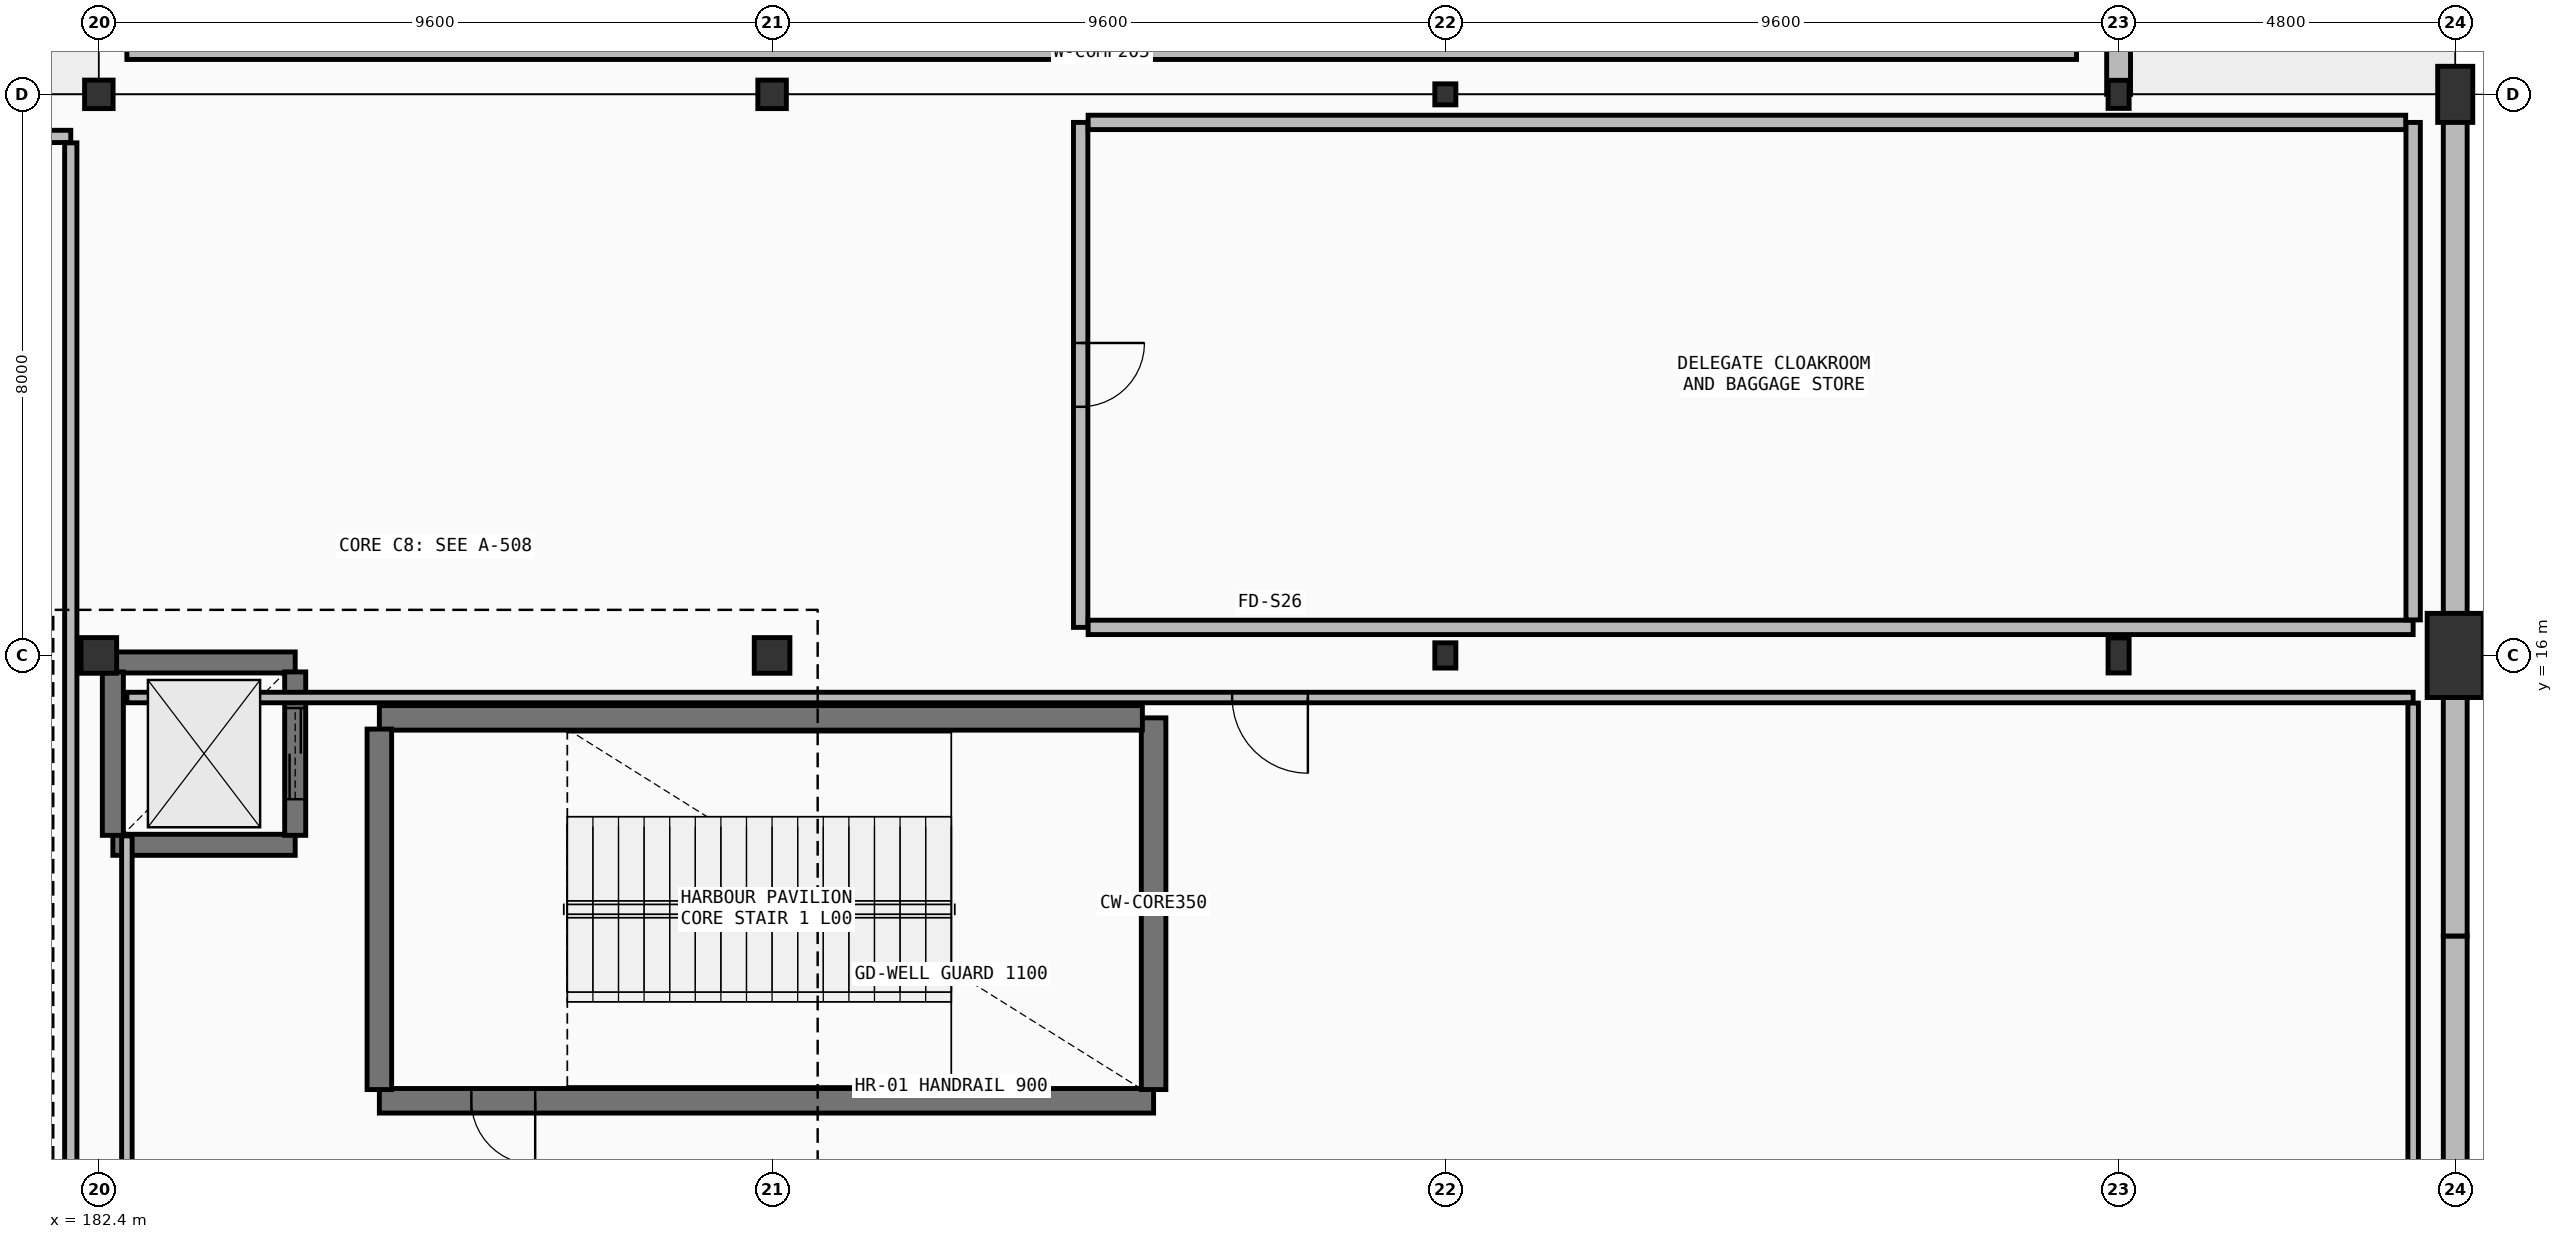
"""IFC4 building model, lengths in metres.
Left out: names, types, materials, properties, quantities, classifications, styles, units other than length and angle.
Written with IfcOpenShell. Run it as: python <this file> out.ifc"""

import sys

from ifc_helpers import new_model, si_unit, direction, frame, frame_2d, origin, origin_2d, place, context, subcontext, project, spatial, rectangle, hollow_circle, i_section, extrude, element, fill, save


model = new_model("IFC4")
c1 = context("Model", 3, precision=1e-05, world=origin(), true_north=direction((0.0, 1.0)))
c2 = subcontext(c1, "Body", "Model", "MODEL_VIEW")
j1 = project(units=[si_unit("LENGTHUNIT", "METRE"), si_unit("PLANEANGLEUNIT", "RADIAN")], contexts=[c1])
p1 = place(None, origin())
s1 = spatial("IfcSite", under=j1, at=p1, CompositionType="ELEMENT")
p2 = place(p1, origin())
s2 = spatial("IfcBuilding", under=s1, at=p2, CompositionType="ELEMENT")
p3 = place(p2, origin())
s3 = spatial("IfcBuildingStorey", under=s2, at=p3, CompositionType="ELEMENT", Elevation=0.0)
p4 = place(p3, frame((182.4, 16.0, 0.0), z_axis=(0.0, 0.0, 1.0), x_axis=(1.0, 0.0, 0.0)))
e1 = element("IfcColumn", 1, at=p4, inside=s3, PredefinedType="COLUMN", context=c2, shape_type="SweptSolid", body=[
    extrude(hollow_circle(Radius=0.254, WallThickness=0.025, at=origin_2d()), origin(), (0.0, 0.0, 1.0), 6.0),
])
p5 = place(p3, frame((182.4, 24.0, 0.0), z_axis=(0.0, 0.0, 1.0), x_axis=(1.0, 0.0, 0.0)))
e2 = element("IfcColumn", 2, at=p5, inside=s3, PredefinedType="COLUMN", context=c2, shape_type="SweptSolid", body=[
    extrude(hollow_circle(Radius=0.203, WallThickness=0.02, at=origin_2d()), origin(), (0.0, 0.0, 1.0), 6.0),
])
p6 = place(p3, frame((192.0, 16.0, 0.0), z_axis=(0.0, 0.0, 1.0), x_axis=(1.0, 0.0, 0.0)))
e3 = element("IfcColumn", 3, at=p6, inside=s3, PredefinedType="COLUMN", context=c2, shape_type="SweptSolid", body=[
    extrude(hollow_circle(Radius=0.254, WallThickness=0.025, at=origin_2d()), origin(), (0.0, 0.0, 1.0), 6.0),
])
p7 = place(p3, frame((192.0, 24.0, 0.0), z_axis=(0.0, 0.0, 1.0), x_axis=(1.0, 0.0, 0.0)))
e4 = element("IfcColumn", 4, at=p7, inside=s3, PredefinedType="COLUMN", context=c2, shape_type="SweptSolid", body=[
    extrude(hollow_circle(Radius=0.203, WallThickness=0.02, at=origin_2d()), origin(), (0.0, 0.0, 1.0), 6.0),
])
p8 = place(p3, frame((201.6, 16.0, 0.0), z_axis=(0.0, 0.0, 1.0), x_axis=(1.0, 0.0, 0.0)))
e5 = element("IfcColumn", 5, at=p8, inside=s3, PredefinedType="COLUMN", context=c2, shape_type="SweptSolid", body=[
    extrude(i_section(OverallWidth=0.3, OverallDepth=0.36, WebThickness=0.012, FlangeThickness=0.022, FilletRadius=0.027, at=origin_2d()), origin(), (0.0, 0.0, 1.0), 6.0),
])
p9 = place(p3, frame((201.6, 24.0, 0.0), z_axis=(0.0, 0.0, 1.0), x_axis=(1.0, 0.0, 0.0)))
e6 = element("IfcColumn", 6, at=p9, inside=s3, PredefinedType="COLUMN", context=c2, shape_type="SweptSolid", body=[
    extrude(i_section(OverallWidth=0.3, OverallDepth=0.3, WebThickness=0.011, FlangeThickness=0.019, FilletRadius=0.027, at=origin_2d()), origin(), (0.0, 0.0, 1.0), 6.0),
])
p10 = place(p3, frame((211.2, 16.0, 0.0), z_axis=(0.0, 0.0, 1.0), x_axis=(1.0, 0.0, 0.0)))
e7 = element("IfcColumn", 7, at=p10, inside=s3, PredefinedType="COLUMN", context=c2, shape_type="SweptSolid", body=[
    extrude(i_section(OverallWidth=0.3, OverallDepth=0.5, WebThickness=0.014, FlangeThickness=0.028, FilletRadius=0.027, at=origin_2d()), origin(), (0.0, 0.0, 1.0), 6.0),
])
p11 = place(p3, frame((211.2, 24.0, 0.0), z_axis=(0.0, 0.0, 1.0), x_axis=(1.0, 0.0, 0.0)))
e8 = element("IfcColumn", 8, at=p11, inside=s3, PredefinedType="COLUMN", context=c2, shape_type="SweptSolid", body=[
    extrude(i_section(OverallWidth=0.3, OverallDepth=0.4, WebThickness=0.013, FlangeThickness=0.024, FilletRadius=0.027, at=origin_2d()), origin(), (0.0, 0.0, 1.0), 6.0),
])
p12 = place(p3, frame((216.0, 16.0, -5.4), z_axis=(0.0, 0.0, 1.0), x_axis=(1.0, 0.0, 0.0)))
e9 = element("IfcColumn", 9, at=p12, inside=s3, PredefinedType="PILASTER", context=c2, shape_type="SweptSolid", body=[
    extrude(rectangle(XDim=0.8, YDim=1.2, at=origin_2d()), origin(), (0.0, 0.0, 1.0), 11.4),
])
p13 = place(p3, frame((216.0, 24.0, -5.4), z_axis=(0.0, 0.0, 1.0), x_axis=(1.0, 0.0, 0.0)))
e10 = element("IfcColumn", 10, at=p13, inside=s3, PredefinedType="PILASTER", context=c2, shape_type="SweptSolid", body=[
    extrude(rectangle(XDim=0.5, YDim=0.8, at=origin_2d()), origin(), (0.0, 0.0, 1.0), 11.4),
])
p14 = place(p3, frame((216.0, 0.0, 0.0), z_axis=(0.0, 0.0, 1.0), x_axis=(0.0, 1.0, 0.0)))
e11 = element("IfcWall", 11, at=p14, inside=s3, PredefinedType="SOLIDWALL", context=c2, shape_type="SweptSolid", body=[
    extrude(rectangle(XDim=12.0, YDim=0.34, at=frame_2d((6.0, 0.0))), origin(), (0.0, 0.0, 1.0), 5.04),
])
p15 = place(p3, frame((216.0, 12.0, 0.0), z_axis=(0.0, 0.0, 1.0), x_axis=(0.0, 1.0, 0.0)))
e12 = element("IfcWall", 12, at=p15, inside=s3, PredefinedType="SOLIDWALL", context=c2, shape_type="SweptSolid", body=[
    extrude(rectangle(XDim=12.0, YDim=0.34, at=frame_2d((6.0, 0.0))), origin(), (0.0, 0.0, 1.0), 5.09),
])
p16 = place(p3, frame((197.44, 9.65, 0.0), z_axis=(0.0, 0.0, 1.0), x_axis=(-1.0, 0.0, 0.0)))
e13 = element("IfcWall", 13, at=p16, inside=s3, PredefinedType="SHEAR", context=c2, shape_type="SweptSolid", body=[
    extrude(rectangle(XDim=11.04, YDim=0.35, at=frame_2d((5.52, 0.0))), origin(), (0.0, 0.0, 1.0), 5.77),
])
p17 = place(p16, frame((8.818, 0.0, 0.0)))
e14 = element("IfcOpeningElement", 14, at=p17, cuts=e13, PredefinedType="OPENING", context=c2, shape_type="SweptSolid", body=[
    extrude(rectangle(XDim=0.91, YDim=2.08, at=frame_2d((0.455, 1.04))), frame((0.0, 0.185, 0.0), z_axis=(0.0, -1.0, 0.0), x_axis=(1.0, 0.0, 0.0)), (0.0, 0.0, 1.0), 0.37),
])
p18 = place(p3, frame((197.44, 15.11, 0.0), z_axis=(0.0, 0.0, 1.0), x_axis=(0.0, -1.0, 0.0)))
e15 = element("IfcWall", 15, at=p18, inside=s3, PredefinedType="SHEAR", context=c2, shape_type="SweptSolid", body=[
    extrude(rectangle(XDim=5.3, YDim=0.35, at=frame_2d((2.65, 0.0))), origin(), (0.0, 0.0, 1.0), 5.77),
])
p19 = place(p3, frame((186.4, 15.11, 0.0), z_axis=(0.0, 0.0, 1.0), x_axis=(1.0, 0.0, 0.0)))
e16 = element("IfcWall", 16, at=p19, inside=s3, PredefinedType="SHEAR", context=c2, shape_type="SweptSolid", body=[
    extrude(rectangle(XDim=10.88, YDim=0.35, at=frame_2d((5.44, 0.0))), origin(), (0.0, 0.0, 1.0), 5.77),
])
p20 = place(p3, frame((186.4, 9.81, 0.0), z_axis=(0.0, 0.0, 1.0), x_axis=(0.0, 1.0, 0.0)))
e17 = element("IfcWall", 17, at=p20, inside=s3, PredefinedType="SHEAR", context=c2, shape_type="SweptSolid", body=[
    extrude(rectangle(XDim=5.14, YDim=0.35, at=frame_2d((2.57, 0.0))), origin(), (0.0, 0.0, 1.0), 5.77),
])
for number, where, z_axis, x_axis in (
    (18, (185.2, 15.9, 0.0), (0.0, 0.0, 1.0), (-1.0, 0.0, 0.0)),
    (19, (182.6, 13.3, 0.0), (0.0, 0.0, 1.0), (1.0, 0.0, 0.0)),
):
    element("IfcWall", number, at=place(p3, frame(where, z_axis=z_axis, x_axis=x_axis)), inside=s3, PredefinedType="SHEAR", context=c2, shape_type="SweptSolid", body=[
        extrude(rectangle(XDim=2.6, YDim=0.3, at=frame_2d((1.3, 0.0))), origin(), (0.0, 0.0, 1.0), 5.77),
    ])
p21 = place(p3, frame((185.2, 13.435, 0.0), z_axis=(0.0, 0.0, 1.0), x_axis=(0.0, 1.0, 0.0)))
e20 = element("IfcWall", 20, at=p21, inside=s3, PredefinedType="SHEAR", context=c2, shape_type="SweptSolid", body=[
    extrude(rectangle(XDim=2.33, YDim=0.3, at=frame_2d((1.165, 0.0))), origin(), (0.0, 0.0, 1.0), 5.77),
])
p22 = place(p21, frame((0.515, 0.0, 0.0)))
e21 = element("IfcOpeningElement", 21, at=p22, cuts=e20, PredefinedType="OPENING", context=c2, shape_type="SweptSolid", body=[
    extrude(rectangle(XDim=1.3, YDim=2.22, at=frame_2d((0.65, 1.11))), frame((0.0, 0.16, 0.0), z_axis=(0.0, -1.0, 0.0), x_axis=(1.0, 0.0, 0.0)), (0.0, 0.0, 1.0), 0.32),
])
p23 = place(p3, frame((182.6, 15.765, 0.0), z_axis=(0.0, 0.0, 1.0), x_axis=(0.0, -1.0, 0.0)))
e22 = element("IfcWall", 22, at=p23, inside=s3, PredefinedType="SHEAR", context=c2, shape_type="SweptSolid", body=[
    extrude(rectangle(XDim=2.33, YDim=0.3, at=frame_2d((1.165, 0.0))), origin(), (0.0, 0.0, 1.0), 5.77),
])
p24 = place(p3, frame((182.8, 24.6, 0.0), z_axis=(0.0, 0.0, 1.0), x_axis=(1.0, 0.0, 0.0)))
e23 = element("IfcWall", 23, at=p24, inside=s3, PredefinedType="SOLIDWALL", context=c2, shape_type="SweptSolid", body=[
    extrude(rectangle(XDim=27.8, YDim=0.205, at=frame_2d((13.9, 0.0))), origin(), (0.0, 0.0, 1.0), 5.02),
])
p25 = place(p3, frame((182.0, 23.4, 0.0), z_axis=(0.0, 0.0, 1.0), x_axis=(-1.0, 0.0, 0.0)))
e24 = element("IfcWall", 24, at=p25, inside=s3, PredefinedType="PARTITIONING", context=c2, shape_type="SweptSolid", body=[
    extrude(rectangle(XDim=37.6, YDim=0.175, at=frame_2d((18.8, 0.0))), origin(), (0.0, 0.0, 1.0), 5.14),
])
p26 = place(p25, frame((14.256, 0.0, 0.0)))
e25 = element("IfcOpeningElement", 25, at=p26, cuts=e24, PredefinedType="OPENING", context=c2, shape_type="SweptSolid", body=[
    extrude(rectangle(XDim=1.96, YDim=2.36, at=frame_2d((0.98, 1.18))), frame((0.0, 0.097, 0.0), z_axis=(0.0, -1.0, 0.0), x_axis=(1.0, 0.0, 0.0)), (0.0, 0.0, 1.0), 0.195),
])
p27 = place(p25, frame((30.337, 0.0, 0.0)))
e26 = element("IfcOpeningElement", 26, at=p27, cuts=e24, PredefinedType="OPENING", context=c2, shape_type="SweptSolid", body=[
    extrude(rectangle(XDim=1.05, YDim=2.35, at=frame_2d((0.525, 1.175))), frame((0.0, 0.097, 0.0), z_axis=(0.0, -1.0, 0.0), x_axis=(1.0, 0.0, 0.0)), (0.0, 0.0, 1.0), 0.195),
])
p28 = place(p3, frame((182.0, 0.691, 0.0), z_axis=(0.0, 0.0, 1.0), x_axis=(0.0, 1.0, 0.0)))
e27 = element("IfcWall", 27, at=p28, inside=s3, PredefinedType="PARTITIONING", context=c2, shape_type="SweptSolid", body=[
    extrude(rectangle(XDim=22.617, YDim=0.175, at=frame_2d((11.309, 0.0))), origin(), (0.0, 0.0, 1.0), 5.14),
])
p29 = place(p3, frame((215.4, 15.4, 0.0), z_axis=(0.0, 0.0, 1.0), x_axis=(-1.0, 0.0, 0.0)))
e28 = element("IfcWall", 28, at=p29, inside=s3, PredefinedType="PARTITIONING", context=c2, shape_type="SweptSolid", body=[
    extrude(rectangle(XDim=32.6, YDim=0.15, at=frame_2d((16.3, 0.0))), origin(), (0.0, 0.0, 1.0), 4.84),
])
p30 = place(p29, frame((15.76, 0.0, 0.0)))
e29 = element("IfcOpeningElement", 29, at=p30, cuts=e28, PredefinedType="OPENING", context=c2, shape_type="SweptSolid", body=[
    extrude(rectangle(XDim=1.08, YDim=2.38, at=frame_2d((0.54, 1.19))), frame((0.0, 0.085, 0.0), z_axis=(0.0, -1.0, 0.0), x_axis=(1.0, 0.0, 0.0)), (0.0, 0.0, 1.0), 0.17),
])
p31 = place(p3, frame((215.4, 0.679, 0.0), z_axis=(0.0, 0.0, 1.0), x_axis=(0.0, 1.0, 0.0)))
e30 = element("IfcWall", 30, at=p31, inside=s3, PredefinedType="PARTITIONING", context=c2, shape_type="SweptSolid", body=[
    extrude(rectangle(XDim=14.642, YDim=0.15, at=frame_2d((7.321, 0.0))), origin(), (0.0, 0.0, 1.0), 5.04),
])
p32 = place(p3, frame((182.8, 13.427, 0.0), z_axis=(0.0, 0.0, 1.0), x_axis=(0.0, -1.0, 0.0)))
e31 = element("IfcWall", 31, at=p32, inside=s3, PredefinedType="PARTITIONING", context=c2, shape_type="SweptSolid", body=[
    extrude(rectangle(XDim=12.748, YDim=0.15, at=frame_2d((6.374, 0.0))), origin(), (0.0, 0.0, 1.0), 5.19),
])
p33 = place(p3, frame((196.4, 23.6, 0.0), z_axis=(0.0, 0.0, 1.0), x_axis=(0.0, -1.0, 0.0)))
e32 = element("IfcWall", 32, at=p33, inside=s3, PredefinedType="SOLIDWALL", context=c2, shape_type="SweptSolid", body=[
    extrude(rectangle(XDim=7.2, YDim=0.205, at=frame_2d((3.6, 0.0))), origin(), (0.0, 0.0, 1.0), 5.77),
])
p34 = place(p33, frame((3.145, 0.0, 0.0)))
e33 = element("IfcOpeningElement", 33, at=p34, cuts=e32, PredefinedType="OPENING", context=c2, shape_type="SweptSolid", body=[
    extrude(rectangle(XDim=0.91, YDim=2.08, at=frame_2d((0.455, 1.04))), frame((0.0, 0.113, 0.0), z_axis=(0.0, -1.0, 0.0), x_axis=(1.0, 0.0, 0.0)), (0.0, 0.0, 1.0), 0.225),
])
p35 = place(p3, frame((196.507, 16.4, 0.0), z_axis=(0.0, 0.0, 1.0), x_axis=(1.0, 0.0, 0.0)))
e34 = element("IfcWall", 34, at=p35, inside=s3, PredefinedType="SOLIDWALL", context=c2, shape_type="SweptSolid", body=[
    extrude(rectangle(XDim=18.893, YDim=0.205, at=frame_2d((9.447, 0.0))), origin(), (0.0, 0.0, 1.0), 5.04),
])
p36 = place(p3, frame((215.4, 16.507, 0.0), z_axis=(0.0, 0.0, 1.0), x_axis=(0.0, 1.0, 0.0)))
e35 = element("IfcWall", 35, at=p36, inside=s3, PredefinedType="SOLIDWALL", context=c2, shape_type="SweptSolid", body=[
    extrude(rectangle(XDim=7.094, YDim=0.205, at=frame_2d((3.547, 0.0))), origin(), (0.0, 0.0, 1.0), 5.77),
])
p37 = place(p3, frame((215.293, 23.6, 0.0), z_axis=(0.0, 0.0, 1.0), x_axis=(-1.0, 0.0, 0.0)))
e36 = element("IfcWall", 36, at=p37, inside=s3, PredefinedType="SOLIDWALL", context=c2, shape_type="SweptSolid", body=[
    extrude(rectangle(XDim=18.787, YDim=0.205, at=frame_2d((9.394, 0.0))), origin(), (0.0, 0.0, 1.0), 5.04),
])
p38 = place(p3, frame((211.2, 40.0, 0.0), z_axis=(0.0, 0.0, 1.0), x_axis=(0.0, -1.0, 0.0)))
e37 = element("IfcWall", 37, at=p38, inside=s3, PredefinedType="SOLIDWALL", context=c2, shape_type="SweptSolid", body=[
    extrude(rectangle(XDim=16.0, YDim=0.34, at=frame_2d((8.0, 0.0))), origin(), (0.0, 0.0, 1.0), 5.09),
])
p39 = place(p17, origin())
e38 = element("IfcDoor", 38, at=p39, inside=s3, OperationType="SINGLE_SWING_RIGHT", PredefinedType="DOOR", context=c2, shape_type="SweptSolid", body=[
    extrude(rectangle(XDim=0.91, YDim=2.08, at=frame_2d((0.455, 1.04))), frame((0.0, 0.025, 0.0), z_axis=(0.0, -1.0, 0.0), x_axis=(1.0, 0.0, 0.0)), (0.0, 0.0, 1.0), 0.05),
])
fill(e14, e38)
p40 = place(p22, origin())
e39 = element("IfcDoor", 39, at=p40, inside=s3, OperationType="DOUBLE_DOOR_SLIDING", PredefinedType="DOOR", context=c2, shape_type="SweptSolid", body=[
    extrude(rectangle(XDim=1.3, YDim=2.22, at=frame_2d((0.65, 1.11))), frame((0.0, 0.025, 0.0), z_axis=(0.0, -1.0, 0.0), x_axis=(1.0, 0.0, 0.0)), (0.0, 0.0, 1.0), 0.05),
])
fill(e21, e39)
p41 = place(p30, origin())
e40 = element("IfcDoor", 40, at=p41, inside=s3, OperationType="SINGLE_SWING_RIGHT", PredefinedType="DOOR", context=c2, shape_type="SweptSolid", body=[
    extrude(rectangle(XDim=1.08, YDim=2.38, at=frame_2d((0.54, 1.19))), frame((0.0, 0.025, 0.0), z_axis=(0.0, -1.0, 0.0), x_axis=(1.0, 0.0, 0.0)), (0.0, 0.0, 1.0), 0.05),
])
fill(e29, e40)
p42 = place(p34, origin())
e41 = element("IfcDoor", 41, at=p42, inside=s3, OperationType="SINGLE_SWING_LEFT", PredefinedType="DOOR", context=c2, shape_type="SweptSolid", body=[
    extrude(rectangle(XDim=0.91, YDim=2.08, at=frame_2d((0.455, 1.04))), frame((0.0, 0.025, 0.0), z_axis=(0.0, -1.0, 0.0), x_axis=(1.0, 0.0, 0.0)), (0.0, 0.0, 1.0), 0.05),
])
fill(e33, e41)
save(model, sys.argv[1])
